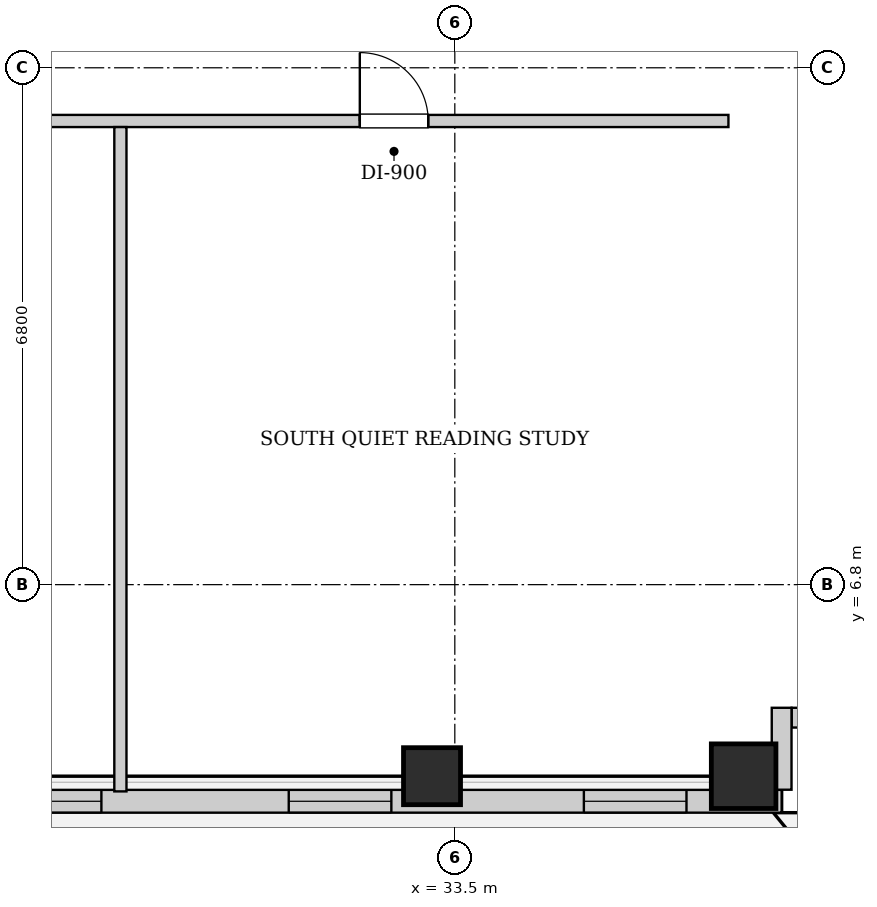
"""IFC4 building model, lengths in metres.
Left out: names, types, materials, properties, quantities, classifications, styles, units other than length and angle.
Written with IfcOpenShell. Run it as: python <this file> out.ifc"""

import sys

from ifc_helpers import new_model, si_unit, direction, frame, frame_2d, origin, origin_2d, place, context, subcontext, project, spatial, rectangle, extrude, element, fill, save


model = new_model("IFC4")
c1 = context("Model", 3, precision=1e-05, world=origin(), true_north=direction((0.0, 1.0)))
c2 = subcontext(c1, "Body", "Model", "MODEL_VIEW")
j1 = project(units=[si_unit("LENGTHUNIT", "METRE"), si_unit("PLANEANGLEUNIT", "RADIAN")], contexts=[c1])
p1 = place(None, origin())
s1 = spatial("IfcSite", under=j1, at=p1, CompositionType="ELEMENT")
p2 = place(p1, origin())
s2 = spatial("IfcBuilding", under=s1, at=p2, CompositionType="ELEMENT")
p3 = place(p2, frame((0.0, 0.0, 124.4)))
s3 = spatial("IfcBuildingStorey", under=s2, at=p3, CompositionType="ELEMENT", Elevation=124.4)
p4 = place(p3, frame((33.2, 4.28, 0.0), z_axis=(0.0, 0.0, 1.0), x_axis=(1.0, 0.0, 0.0)))
e1 = element("IfcColumn", 1, at=p4, inside=s3, PredefinedType="COLUMN", context=c2, shape_type="SweptSolid", body=[
    extrude(rectangle(XDim=0.75, YDim=0.75, at=origin_2d()), origin(), (0.0, 0.0, 1.0), 3.25),
])
p5 = place(p3, frame((37.3, 4.28, 0.0), z_axis=(0.0, 0.0, 1.0), x_axis=(1.0, 0.0, 0.0)))
e2 = element("IfcColumn", 2, at=p5, inside=s3, PredefinedType="COLUMN", context=c2, shape_type="SweptSolid", body=[
    extrude(rectangle(XDim=0.85, YDim=0.85, at=origin_2d()), origin(), (0.0, 0.0, 1.0), 3.25),
])
p6 = place(p3, frame((37.8, 3.95, 0.0), z_axis=(0.0, 0.0, 1.0), x_axis=(-1.0, 0.0, 0.0)))
e3 = element("IfcWall", 3, at=p6, inside=s3, PredefinedType="SOLIDWALL", context=c2, shape_type="SweptSolid", body=[
    extrude(rectangle(XDim=27.8, YDim=0.3, at=frame_2d((13.9, 0.0))), origin(), (0.0, 0.0, 1.0), 2.99),
])
p7 = place(p6, frame((15.52, 0.0, 0.0)))
e4 = element("IfcOpeningElement", 4, at=p7, cuts=e3, PredefinedType="OPENING", context=c2, shape_type="SweptSolid", body=[
    extrude(rectangle(XDim=1.5, YDim=1.982, at=frame_2d((0.75, 0.991))), frame((0.0, 0.16, 0.0), z_axis=(0.0, -1.0, 0.0), x_axis=(1.0, 0.0, 0.0)), (0.0, 0.0, 1.0), 0.32),
])
p8 = place(p6, frame((17.28, 0.0, 0.55)))
e5 = element("IfcOpeningElement", 5, at=p8, cuts=e3, PredefinedType="OPENING", context=c2, shape_type="SweptSolid", body=[
    extrude(rectangle(XDim=1.35, YDim=1.2, at=frame_2d((0.675, 0.6))), frame((0.0, 0.16, 0.0), z_axis=(0.0, -1.0, 0.0), x_axis=(1.0, 0.0, 0.0)), (0.0, 0.0, 1.0), 0.32),
])
p9 = place(p6, frame((8.95, 0.0, 0.55)))
e6 = element("IfcOpeningElement", 6, at=p9, cuts=e3, PredefinedType="OPENING", context=c2, shape_type="SweptSolid", body=[
    extrude(rectangle(XDim=1.35, YDim=1.2, at=frame_2d((0.675, 0.6))), frame((0.0, 0.16, 0.0), z_axis=(0.0, -1.0, 0.0), x_axis=(1.0, 0.0, 0.0)), (0.0, 0.0, 1.0), 0.32),
])
p10 = place(p6, frame((5.135, 0.0, 0.55)))
e7 = element("IfcOpeningElement", 7, at=p10, cuts=e3, PredefinedType="OPENING", context=c2, shape_type="SweptSolid", body=[
    extrude(rectangle(XDim=1.35, YDim=1.2, at=frame_2d((0.675, 0.6))), frame((0.0, 0.16, 0.0), z_axis=(0.0, -1.0, 0.0), x_axis=(1.0, 0.0, 0.0)), (0.0, 0.0, 1.0), 0.32),
])
p11 = place(p6, frame((1.252, 0.0, 0.55)))
e8 = element("IfcOpeningElement", 8, at=p11, cuts=e3, PredefinedType="OPENING", context=c2, shape_type="SweptSolid", body=[
    extrude(rectangle(XDim=1.35, YDim=1.2, at=frame_2d((0.675, 0.6))), frame((0.0, 0.16, 0.0), z_axis=(0.0, -1.0, 0.0), x_axis=(1.0, 0.0, 0.0)), (0.0, 0.0, 1.0), 0.32),
])
p12 = place(p3, frame((38.918, 5.05, 0.0), z_axis=(0.0, 0.0, 1.0), x_axis=(-1.0, 0.0, 0.0)))
e9 = element("IfcWall", 9, at=p12, inside=s3, PredefinedType="SOLIDWALL", context=c2, shape_type="SweptSolid", body=[
    extrude(rectangle(XDim=0.986, YDim=0.26, at=frame_2d((0.493, 0.0))), origin(), (0.0, 0.0, 1.0), 2.99),
])
p13 = place(p3, frame((37.8, 5.18, 0.0), z_axis=(0.0, 0.0, 1.0), x_axis=(0.0, -1.0, 0.0)))
e10 = element("IfcWall", 10, at=p13, inside=s3, PredefinedType="SOLIDWALL", context=c2, shape_type="SweptSolid", body=[
    extrude(rectangle(XDim=1.078, YDim=0.26, at=frame_2d((0.539, 0.0))), origin(), (0.0, 0.0, 1.0), 2.99),
])
p14 = place(p3, frame((10.7, 12.9, 0.0), z_axis=(0.0, 0.0, 1.0), x_axis=(1.0, 0.0, 0.0)))
e11 = element("IfcWall", 11, at=p14, inside=s3, PredefinedType="PARTITIONING", context=c2, shape_type="SweptSolid", body=[
    extrude(rectangle(XDim=26.4, YDim=0.16, at=frame_2d((13.2, 0.0))), origin(), (0.0, 0.0, 1.0), 2.99),
])
p15 = place(p14, frame((3.05, 0.0, 0.0)))
e12 = element("IfcOpeningElement", 12, at=p15, cuts=e11, PredefinedType="OPENING", context=c2, shape_type="SweptSolid", body=[
    extrude(rectangle(XDim=0.9, YDim=2.05, at=frame_2d((0.45, 1.025))), frame((0.0, 0.09, 0.0), z_axis=(0.0, -1.0, 0.0), x_axis=(1.0, 0.0, 0.0)), (0.0, 0.0, 1.0), 0.18),
])
p16 = place(p14, frame((11.725, 0.0, 0.0)))
e13 = element("IfcOpeningElement", 13, at=p16, cuts=e11, PredefinedType="OPENING", context=c2, shape_type="SweptSolid", body=[
    extrude(rectangle(XDim=1.05, YDim=2.05, at=frame_2d((0.525, 1.025))), frame((0.0, 0.09, 0.0), z_axis=(0.0, -1.0, 0.0), x_axis=(1.0, 0.0, 0.0)), (0.0, 0.0, 1.0), 0.18),
])
p17 = place(p14, frame((21.55, 0.0, 0.0)))
e14 = element("IfcOpeningElement", 14, at=p17, cuts=e11, PredefinedType="OPENING", context=c2, shape_type="SweptSolid", body=[
    extrude(rectangle(XDim=0.9, YDim=2.05, at=frame_2d((0.45, 1.025))), frame((0.0, 0.09, 0.0), z_axis=(0.0, -1.0, 0.0), x_axis=(1.0, 0.0, 0.0)), (0.0, 0.0, 1.0), 0.18),
])
p18 = place(p3, frame((29.1, 4.08, 0.0), z_axis=(0.0, 0.0, 1.0), x_axis=(0.0, 1.0, 0.0)))
e15 = element("IfcWall", 15, at=p18, inside=s3, PredefinedType="PARTITIONING", context=c2, shape_type="SweptSolid", body=[
    extrude(rectangle(XDim=8.74, YDim=0.16, at=frame_2d((4.37, 0.0))), origin(), (0.0, 0.0, 1.0), 2.99),
])
p19 = place(p17, origin())
e16 = element("IfcDoor", 16, at=p19, inside=s3, OperationType="SINGLE_SWING_LEFT", PredefinedType="DOOR", context=c2, shape_type="SweptSolid", body=[
    extrude(rectangle(XDim=0.9, YDim=2.05, at=frame_2d((0.45, 1.025))), frame((0.0, 0.025, 0.0), z_axis=(0.0, -1.0, 0.0), x_axis=(1.0, 0.0, 0.0)), (0.0, 0.0, 1.0), 0.05),
])
fill(e14, e16)
p20 = place(p9, origin())
e17 = element("IfcWindow", 17, at=p20, inside=s3, PartitioningType="SINGLE_PANEL", PredefinedType="WINDOW", context=c2, shape_type="SweptSolid", body=[
    extrude(rectangle(XDim=1.35, YDim=1.2, at=frame_2d((0.675, 0.6))), frame((0.0, 0.03, 0.0), z_axis=(0.0, -1.0, 0.0), x_axis=(1.0, 0.0, 0.0)), (0.0, 0.0, 1.0), 0.06),
])
fill(e6, e17)
p21 = place(p10, origin())
e18 = element("IfcWindow", 18, at=p21, inside=s3, PartitioningType="SINGLE_PANEL", PredefinedType="WINDOW", context=c2, shape_type="SweptSolid", body=[
    extrude(rectangle(XDim=1.35, YDim=1.2, at=frame_2d((0.675, 0.6))), frame((0.0, 0.03, 0.0), z_axis=(0.0, -1.0, 0.0), x_axis=(1.0, 0.0, 0.0)), (0.0, 0.0, 1.0), 0.06),
])
fill(e7, e18)
p22 = place(p11, origin())
e19 = element("IfcWindow", 19, at=p22, inside=s3, PartitioningType="SINGLE_PANEL", PredefinedType="WINDOW", context=c2, shape_type="SweptSolid", body=[
    extrude(rectangle(XDim=1.35, YDim=1.2, at=frame_2d((0.675, 0.6))), frame((0.0, 0.03, 0.0), z_axis=(0.0, -1.0, 0.0), x_axis=(1.0, 0.0, 0.0)), (0.0, 0.0, 1.0), 0.06),
])
fill(e8, e19)
save(model, sys.argv[1])
